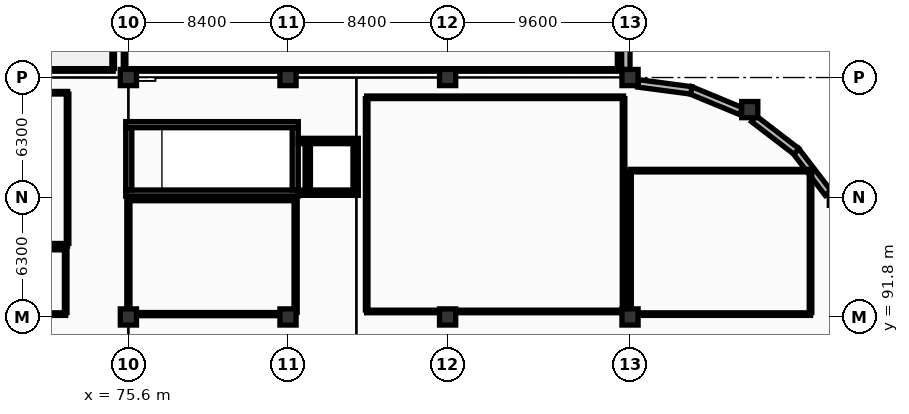
"""IFC4 building model, lengths in metres.
Left out: names, types, materials, properties, quantities, classifications, styles, units other than length and angle.
Written with IfcOpenShell. Run it as: python <this file> out.ifc"""

import sys

from ifc_helpers import new_model, si_unit, direction, frame, frame_2d, origin, origin_2d, place, context, subcontext, project, spatial, rectangle, circle, extrude, element, fill, save


model = new_model("IFC4")
c1 = context("Model", 3, precision=1e-05, world=origin(), true_north=direction((0.0, 1.0)))
c2 = subcontext(c1, "Body", "Model", "MODEL_VIEW")
j1 = project(units=[si_unit("LENGTHUNIT", "METRE"), si_unit("PLANEANGLEUNIT", "RADIAN")], contexts=[c1])
p1 = place(None, origin())
s1 = spatial("IfcSite", under=j1, at=p1, CompositionType="ELEMENT")
p2 = place(p1, origin())
s2 = spatial("IfcBuilding", under=s1, at=p2, CompositionType="ELEMENT")
p3 = place(p2, origin())
s3 = spatial("IfcBuildingStorey", under=s2, at=p3, CompositionType="ELEMENT", Elevation=0.0)
for number, where, z_axis, x_axis in (
    (1, (75.6, 91.8, 0.0), (0.0, 0.0, 1.0), (1.0, 0.0, 0.0)),
    (2, (75.6, 104.4, 0.0), (0.0, 0.0, 1.0), (1.0, 0.0, 0.0)),
    (3, (84.0, 91.8, 0.0), (0.0, 0.0, 1.0), (1.0, 0.0, 0.0)),
    (4, (84.0, 104.4, 0.0), (0.0, 0.0, 1.0), (1.0, 0.0, 0.0)),
    (5, (92.4, 91.8, 0.0), (0.0, 0.0, 1.0), (1.0, 0.0, 0.0)),
    (6, (92.4, 104.4, 0.0), (0.0, 0.0, 1.0), (1.0, 0.0, 0.0)),
    (7, (102.0, 91.8, 0.0), (0.0, 0.0, 1.0), (1.0, 0.0, 0.0)),
    (8, (102.0, 104.4, 0.0), (0.0, 0.0, 1.0), (1.0, 0.0, 0.0)),
):
    element("IfcColumn", number, at=place(p3, frame(where, z_axis=z_axis, x_axis=x_axis)), inside=s3, PredefinedType="COLUMN", context=c2, shape_type="SweptSolid", body=[
        extrude(rectangle(XDim=0.85, YDim=0.85, at=origin_2d()), origin(), (0.0, 0.0, 1.0), 5.4),
    ])
for number, where, z_axis, x_axis in (
    (9, (112.912, 98.1, 0.0), (0.0, 0.0, 1.0), (1.0, 0.0, 0.0)),
    (10, (108.3, 102.712, 0.0), (0.0, 0.0, 1.0), (1.0, 0.0, 0.0)),
):
    element("IfcColumn", number, at=place(p3, frame(where, z_axis=z_axis, x_axis=x_axis)), inside=s3, PredefinedType="COLUMN", context=c2, shape_type="SweptSolid", body=[
        extrude(circle(Radius=0.425, at=origin_2d()), origin(), (0.0, 0.0, 1.0), 5.4),
    ])
p4 = place(p3, frame((101.78, 112.338, 0.0), z_axis=(0.0, 0.0, 1.0), x_axis=(0.0, -1.0, 0.0)))
e11 = element("IfcWall", 11, at=p4, inside=s3, PredefinedType="STANDARD", context=c2, shape_type="SweptSolid", body=[
    extrude(rectangle(XDim=7.521, YDim=0.44, at=frame_2d((3.76, 0.0))), origin(), (0.0, 0.0, 1.0), 4.27),
])
p5 = place(p4, frame((1.563, 0.0, 0.9)))
e12 = element("IfcOpeningElement", 12, at=p5, cuts=e11, PredefinedType="OPENING", context=c2, shape_type="SweptSolid", body=[
    extrude(rectangle(XDim=1.2, YDim=1.85, at=frame_2d((0.6, 0.925))), frame((0.0, 0.23, 0.0), z_axis=(0.0, -1.0, 0.0), x_axis=(1.0, 0.0, 0.0)), (0.0, 0.0, 1.0), 0.46),
])
p6 = place(p4, frame((4.713, 0.0, 0.9)))
e13 = element("IfcOpeningElement", 13, at=p6, cuts=e11, PredefinedType="OPENING", context=c2, shape_type="SweptSolid", body=[
    extrude(rectangle(XDim=1.2, YDim=1.85, at=frame_2d((0.6, 0.925))), frame((0.0, 0.23, 0.0), z_axis=(0.0, -1.0, 0.0), x_axis=(1.0, 0.0, 0.0)), (0.0, 0.0, 1.0), 0.46),
])
p7 = place(p3, frame((112.43, 98.317, 0.0), z_axis=(0.0, 0.0, 1.0), x_axis=(-0.608732750311, 0.793375345407, 0.0)))
e14 = element("IfcWall", 14, at=p7, inside=s3, PredefinedType="ELEMENTEDWALL", context=c2, shape_type="SweptSolid", body=[
    extrude(rectangle(XDim=2.824, YDim=0.395, at=frame_2d((1.412, 0.0))), origin(), (0.0, 0.0, 1.0), 4.27),
])
p8 = place(p3, frame((110.757, 100.511, 0.0), z_axis=(0.0, 0.0, 1.0), x_axis=(-0.793375345407, 0.608732750311, 0.0)))
e15 = element("IfcWall", 15, at=p8, inside=s3, PredefinedType="ELEMENTEDWALL", context=c2, shape_type="SweptSolid", body=[
    extrude(rectangle(XDim=2.824, YDim=0.395, at=frame_2d((1.412, 0.0))), origin(), (0.0, 0.0, 1.0), 4.17),
])
p9 = place(p8, frame((0.962, 0.0, 0.85)))
e16 = element("IfcOpeningElement", 16, at=p9, cuts=e15, PredefinedType="OPENING", context=c2, shape_type="SweptSolid", body=[
    extrude(rectangle(XDim=0.9, YDim=1.85, at=frame_2d((0.45, 0.925))), frame((0.0, 0.208, 0.0), z_axis=(0.0, -1.0, 0.0), x_axis=(1.0, 0.0, 0.0)), (0.0, 0.0, 1.0), 0.415),
])
p10 = place(p3, frame((107.837, 102.633, 0.0), z_axis=(0.0, 0.0, 1.0), x_axis=(-0.923854257916, 0.382744444937, 0.0)))
e17 = element("IfcWall", 17, at=p10, inside=s3, PredefinedType="ELEMENTEDWALL", context=c2, shape_type="SweptSolid", body=[
    extrude(rectangle(XDim=2.892, YDim=0.395, at=frame_2d((1.446, 0.0))), origin(), (0.0, 0.0, 1.0), 4.17),
])
p11 = place(p10, frame((1.03, 0.0, 0.85)))
e18 = element("IfcOpeningElement", 18, at=p11, cuts=e17, PredefinedType="OPENING", context=c2, shape_type="SweptSolid", body=[
    extrude(rectangle(XDim=0.9, YDim=1.85, at=frame_2d((0.45, 0.925))), frame((0.0, 0.208, 0.0), z_axis=(0.0, -1.0, 0.0), x_axis=(1.0, 0.0, 0.0)), (0.0, 0.0, 1.0), 0.415),
])
p12 = place(p3, frame((105.229, 103.723, 0.0), z_axis=(0.0, 0.0, 1.0), x_axis=(-0.991455178228, 0.130447803989, 0.0)))
e19 = element("IfcWall", 19, at=p12, inside=s3, PredefinedType="ELEMENTEDWALL", context=c2, shape_type="SweptSolid", body=[
    extrude(rectangle(XDim=2.824, YDim=0.395, at=frame_2d((1.412, 0.0))), origin(), (0.0, 0.0, 1.0), 4.27),
])
p13 = place(p12, frame((0.962, 0.0, 0.85)))
e20 = element("IfcOpeningElement", 20, at=p13, cuts=e19, PredefinedType="OPENING", context=c2, shape_type="SweptSolid", body=[
    extrude(rectangle(XDim=0.9, YDim=1.85, at=frame_2d((0.45, 0.925))), frame((0.0, 0.208, 0.0), z_axis=(0.0, -1.0, 0.0), x_axis=(1.0, 0.0, 0.0)), (0.0, 0.0, 1.0), 0.415),
])
for number, where, z_axis, x_axis in (
    (21, (75.46, 101.92, 0.0), (0.0, 0.0, 1.0), (1.0, 0.0, 0.0)),
    (22, (84.54, 98.32, 0.0), (0.0, 0.0, 1.0), (-1.0, 0.0, 0.0)),
):
    element("IfcWall", number, at=place(p3, frame(where, z_axis=z_axis, x_axis=x_axis)), inside=s3, PredefinedType="SHEAR", context=c2, shape_type="SweptSolid", body=[
        extrude(rectangle(XDim=9.08, YDim=0.32, at=frame_2d((4.54, 0.0))), origin(), (0.0, 0.0, 1.0), 5.14),
    ])
p14 = place(p3, frame((75.62, 98.48, 0.0), z_axis=(0.0, 0.0, 1.0), x_axis=(0.0, 1.0, 0.0)))
e23 = element("IfcWall", 23, at=p14, inside=s3, PredefinedType="SHEAR", context=c2, shape_type="SweptSolid", body=[
    extrude(rectangle(XDim=3.28, YDim=0.32, at=frame_2d((1.64, 0.0))), origin(), (0.0, 0.0, 1.0), 5.14),
])
p15 = place(p14, frame((1.065, 0.0, 0.0)))
e24 = element("IfcOpeningElement", 24, at=p15, cuts=e23, PredefinedType="OPENING", context=c2, shape_type="SweptSolid", body=[
    extrude(rectangle(XDim=1.15, YDim=2.2, at=frame_2d((0.575, 1.1))), frame((0.0, 0.17, 0.0), z_axis=(0.0, -1.0, 0.0), x_axis=(1.0, 0.0, 0.0)), (0.0, 0.0, 1.0), 0.34),
])
p16 = place(p3, frame((84.38, 101.76, 0.0), z_axis=(0.0, 0.0, 1.0), x_axis=(0.0, -1.0, 0.0)))
e25 = element("IfcWall", 25, at=p16, inside=s3, PredefinedType="SHEAR", context=c2, shape_type="SweptSolid", body=[
    extrude(rectangle(XDim=3.28, YDim=0.32, at=frame_2d((1.64, 0.0))), origin(), (0.0, 0.0, 1.0), 5.14),
])
p17 = place(p3, frame((84.54, 101.06, 0.0), z_axis=(0.0, 0.0, 1.0), x_axis=(1.0, 0.0, 0.0)))
e26 = element("IfcWall", 26, at=p17, inside=s3, PredefinedType="SHEAR", context=c2, shape_type="SweptSolid", body=[
    extrude(rectangle(XDim=3.16, YDim=0.28, at=frame_2d((1.58, 0.0))), origin(), (0.0, 0.0, 1.0), 5.14),
])
p18 = place(p3, frame((87.7, 98.34, 0.0), z_axis=(0.0, 0.0, 1.0), x_axis=(-1.0, 0.0, 0.0)))
e27 = element("IfcWall", 27, at=p18, inside=s3, PredefinedType="SHEAR", context=c2, shape_type="SweptSolid", body=[
    extrude(rectangle(XDim=3.16, YDim=0.28, at=frame_2d((1.58, 0.0))), origin(), (0.0, 0.0, 1.0), 5.14),
])
p19 = place(p18, frame((0.925, 0.0, 0.0)))
e28 = element("IfcOpeningElement", 28, at=p19, cuts=e27, PredefinedType="OPENING", context=c2, shape_type="SweptSolid", body=[
    extrude(rectangle(XDim=0.95, YDim=2.15, at=frame_2d((0.475, 1.075))), frame((0.0, 0.15, 0.0), z_axis=(0.0, -1.0, 0.0), x_axis=(1.0, 0.0, 0.0)), (0.0, 0.0, 1.0), 0.3),
])
for number, where, z_axis, x_axis in (
    (29, (85.04, 98.48, 0.0), (0.0, 0.0, 1.0), (0.0, 1.0, 0.0)),
    (30, (87.56, 100.92, 0.0), (0.0, 0.0, 1.0), (0.0, -1.0, 0.0)),
):
    element("IfcWall", number, at=place(p3, frame(where, z_axis=z_axis, x_axis=x_axis)), inside=s3, PredefinedType="SHEAR", context=c2, shape_type="SweptSolid", body=[
        extrude(rectangle(XDim=2.44, YDim=0.28, at=frame_2d((1.22, 0.0))), origin(), (0.0, 0.0, 1.0), 5.14),
    ])
p20 = place(p3, frame((74.8, 104.8, 0.0), z_axis=(0.0, 0.0, 1.0), x_axis=(-1.0, 0.0, 0.0)))
e31 = element("IfcWall", 31, at=p20, inside=s3, PredefinedType="PARTITIONING", context=c2, shape_type="SweptSolid", body=[
    extrude(rectangle(XDim=15.4, YDim=0.135, at=frame_2d((7.7, 0.0))), origin(), (0.0, 0.0, 1.0), 4.27),
])
p21 = place(p20, frame((2.413, 0.0, 0.0)))
e32 = element("IfcOpeningElement", 32, at=p21, cuts=e31, PredefinedType="OPENING", context=c2, shape_type="SweptSolid", body=[
    extrude(rectangle(XDim=0.95, YDim=2.15, at=frame_2d((0.475, 1.075))), frame((0.0, 0.077, 0.0), z_axis=(0.0, -1.0, 0.0), x_axis=(1.0, 0.0, 0.0)), (0.0, 0.0, 1.0), 0.155),
])
p22 = place(p3, frame((74.8, 112.49, 0.0), z_axis=(0.0, 0.0, 1.0), x_axis=(0.0, -1.0, 0.0)))
e33 = element("IfcWall", 33, at=p22, inside=s3, PredefinedType="PARTITIONING", context=c2, shape_type="SweptSolid", body=[
    extrude(rectangle(XDim=7.613, YDim=0.135, at=frame_2d((3.806, 0.0))), origin(), (0.0, 0.0, 1.0), 4.67),
])
p23 = place(p3, frame((101.566, 104.8, 0.0), z_axis=(0.0, 0.0, 1.0), x_axis=(-1.0, 0.0, 0.0)))
e34 = element("IfcWall", 34, at=p23, inside=s3, PredefinedType="PARTITIONING", context=c2, shape_type="SweptSolid", body=[
    extrude(rectangle(XDim=26.166, YDim=0.135, at=frame_2d((13.083, 0.0))), origin(), (0.0, 0.0, 1.0), 4.27),
])
p24 = place(p23, frame((21.189, 0.0, 0.0)))
e35 = element("IfcOpeningElement", 35, at=p24, cuts=e34, PredefinedType="OPENING", context=c2, shape_type="SweptSolid", body=[
    extrude(rectangle(XDim=0.95, YDim=2.15, at=frame_2d((0.475, 1.075))), frame((0.0, 0.077, 0.0), z_axis=(0.0, -1.0, 0.0), x_axis=(1.0, 0.0, 0.0)), (0.0, 0.0, 1.0), 0.155),
])
p25 = place(p3, frame((75.4, 104.877, 0.0), z_axis=(0.0, 0.0, 1.0), x_axis=(0.0, 1.0, 0.0)))
e36 = element("IfcWall", 36, at=p25, inside=s3, PredefinedType="PARTITIONING", context=c2, shape_type="SweptSolid", body=[
    extrude(rectangle(XDim=7.245, YDim=0.135, at=frame_2d((3.623, 0.0))), origin(), (0.0, 0.0, 1.0), 4.27),
])
p26 = place(p3, frame((101.4, 112.336, 0.0), z_axis=(0.0, 0.0, 1.0), x_axis=(0.0, -1.0, 0.0)))
e37 = element("IfcWall", 37, at=p26, inside=s3, PredefinedType="PARTITIONING", context=c2, shape_type="SweptSolid", body=[
    extrude(rectangle(XDim=7.458, YDim=0.135, at=frame_2d((3.729, 0.0))), origin(), (0.0, 0.0, 1.0), 4.57),
])
for number, where, z_axis, x_axis in (
    (38, (59.0, 103.6, 0.0), (0.0, 0.0, 1.0), (1.0, 0.0, 0.0)),
    (39, (72.4, 95.6, 0.0), (0.0, 0.0, 1.0), (-1.0, 0.0, 0.0)),
):
    element("IfcWall", number, at=place(p3, frame(where, z_axis=z_axis, x_axis=x_axis)), inside=s3, PredefinedType="PARTITIONING", context=c2, shape_type="SweptSolid", body=[
        extrude(rectangle(XDim=13.4, YDim=0.135, at=frame_2d((6.7, 0.0))), origin(), (0.0, 0.0, 1.0), 4.27),
    ])
p27 = place(p3, frame((72.4, 103.522, 0.0), z_axis=(0.0, 0.0, 1.0), x_axis=(0.0, -1.0, 0.0)))
e40 = element("IfcWall", 40, at=p27, inside=s3, PredefinedType="PARTITIONING", context=c2, shape_type="SweptSolid", body=[
    extrude(rectangle(XDim=7.845, YDim=0.135, at=frame_2d((3.922, 0.0))), origin(), (0.0, 0.0, 1.0), 4.52),
])
p28 = place(p27, frame((2.518, 0.0, 0.0)))
e41 = element("IfcOpeningElement", 41, at=p28, cuts=e40, PredefinedType="OPENING", context=c2, shape_type="SweptSolid", body=[
    extrude(rectangle(XDim=0.95, YDim=2.15, at=frame_2d((0.475, 1.075))), frame((0.0, 0.077, 0.0), z_axis=(0.0, -1.0, 0.0), x_axis=(1.0, 0.0, 0.0)), (0.0, 0.0, 1.0), 0.155),
])
p29 = place(p3, frame((67.5, 95.4, 0.0), z_axis=(0.0, 0.0, 1.0), x_axis=(1.0, 0.0, 0.0)))
e42 = element("IfcWall", 42, at=p29, inside=s3, PredefinedType="PARTITIONING", context=c2, shape_type="SweptSolid", body=[
    extrude(rectangle(XDim=4.8, YDim=0.135, at=frame_2d((2.4, 0.0))), origin(), (0.0, 0.0, 1.0), 4.27),
])
p30 = place(p3, frame((72.3, 91.95, 0.0), z_axis=(0.0, 0.0, 1.0), x_axis=(-1.0, 0.0, 0.0)))
e43 = element("IfcWall", 43, at=p30, inside=s3, PredefinedType="PARTITIONING", context=c2, shape_type="SweptSolid", body=[
    extrude(rectangle(XDim=4.8, YDim=0.135, at=frame_2d((2.4, 0.0))), origin(), (0.0, 0.0, 1.0), 4.27),
])
p31 = place(p30, frame((1.61, 0.0, 0.0)))
e44 = element("IfcOpeningElement", 44, at=p31, cuts=e43, PredefinedType="OPENING", context=c2, shape_type="SweptSolid", body=[
    extrude(rectangle(XDim=0.95, YDim=2.15, at=frame_2d((0.475, 1.075))), frame((0.0, 0.077, 0.0), z_axis=(0.0, -1.0, 0.0), x_axis=(1.0, 0.0, 0.0)), (0.0, 0.0, 1.0), 0.155),
])
p32 = place(p3, frame((72.3, 95.323, 0.0), z_axis=(0.0, 0.0, 1.0), x_axis=(0.0, -1.0, 0.0)))
e45 = element("IfcWall", 45, at=p32, inside=s3, PredefinedType="PARTITIONING", context=c2, shape_type="SweptSolid", body=[
    extrude(rectangle(XDim=3.295, YDim=0.135, at=frame_2d((1.647, 0.0))), origin(), (0.0, 0.0, 1.0), 4.47),
])
p33 = place(p3, frame((75.6, 98.0, 0.0), z_axis=(0.0, 0.0, 1.0), x_axis=(1.0, 0.0, 0.0)))
e46 = element("IfcWall", 46, at=p33, inside=s3, PredefinedType="PARTITIONING", context=c2, shape_type="SweptSolid", body=[
    extrude(rectangle(XDim=8.8, YDim=0.165, at=frame_2d((4.4, 0.0))), origin(), (0.0, 0.0, 1.0), 4.27),
])
p34 = place(p3, frame((84.4, 91.95, 0.0), z_axis=(0.0, 0.0, 1.0), x_axis=(-1.0, 0.0, 0.0)))
e47 = element("IfcWall", 47, at=p34, inside=s3, PredefinedType="PARTITIONING", context=c2, shape_type="SweptSolid", body=[
    extrude(rectangle(XDim=8.8, YDim=0.165, at=frame_2d((4.4, 0.0))), origin(), (0.0, 0.0, 1.0), 4.27),
])
p35 = place(p34, frame((4.61, 0.0, 0.0)))
e48 = element("IfcOpeningElement", 48, at=p35, cuts=e47, PredefinedType="OPENING", context=c2, shape_type="SweptSolid", body=[
    extrude(rectangle(XDim=1.0, YDim=2.15, at=frame_2d((0.5, 1.075))), frame((0.0, 0.093, 0.0), z_axis=(0.0, -1.0, 0.0), x_axis=(1.0, 0.0, 0.0)), (0.0, 0.0, 1.0), 0.185),
])
for number, where, z_axis, x_axis in (
    (49, (75.6, 92.042, 0.0), (0.0, 0.0, 1.0), (0.0, 1.0, 0.0)),
    (50, (84.4, 97.907, 0.0), (0.0, 0.0, 1.0), (0.0, -1.0, 0.0)),
):
    element("IfcWall", number, at=place(p3, frame(where, z_axis=z_axis, x_axis=x_axis)), inside=s3, PredefinedType="PARTITIONING", context=c2, shape_type="SweptSolid", body=[
        extrude(rectangle(XDim=5.865, YDim=0.165, at=frame_2d((2.933, 0.0))), origin(), (0.0, 0.0, 1.0), 4.27),
    ])
p36 = place(p3, frame((88.14, 103.36, 0.0), z_axis=(0.0, 0.0, 1.0), x_axis=(1.0, 0.0, 0.0)))
e51 = element("IfcWall", 51, at=p36, inside=s3, PredefinedType="PARTITIONING", context=c2, shape_type="SweptSolid", body=[
    extrude(rectangle(XDim=13.52, YDim=0.135, at=frame_2d((6.76, 0.0))), origin(), (0.0, 0.0, 1.0), 4.27),
])
p37 = place(p3, frame((101.66, 92.09, 0.0), z_axis=(0.0, 0.0, 1.0), x_axis=(-1.0, 0.0, 0.0)))
e52 = element("IfcWall", 52, at=p37, inside=s3, PredefinedType="PARTITIONING", context=c2, shape_type="SweptSolid", body=[
    extrude(rectangle(XDim=13.52, YDim=0.135, at=frame_2d((6.76, 0.0))), origin(), (0.0, 0.0, 1.0), 4.27),
])
p38 = place(p37, frame((2.724, 0.0, 0.0)))
e53 = element("IfcOpeningElement", 53, at=p38, cuts=e52, PredefinedType="OPENING", context=c2, shape_type="SweptSolid", body=[
    extrude(rectangle(XDim=0.95, YDim=2.15, at=frame_2d((0.475, 1.075))), frame((0.0, 0.077, 0.0), z_axis=(0.0, -1.0, 0.0), x_axis=(1.0, 0.0, 0.0)), (0.0, 0.0, 1.0), 0.155),
])
p39 = place(p3, frame((88.14, 92.167, 0.0), z_axis=(0.0, 0.0, 1.0), x_axis=(0.0, 1.0, 0.0)))
e54 = element("IfcWall", 54, at=p39, inside=s3, PredefinedType="PARTITIONING", context=c2, shape_type="SweptSolid", body=[
    extrude(rectangle(XDim=11.115, YDim=0.135, at=frame_2d((5.558, 0.0))), origin(), (0.0, 0.0, 1.0), 4.47),
])
p40 = place(p3, frame((101.66, 103.282, 0.0), z_axis=(0.0, 0.0, 1.0), x_axis=(0.0, -1.0, 0.0)))
e55 = element("IfcWall", 55, at=p40, inside=s3, PredefinedType="PARTITIONING", context=c2, shape_type="SweptSolid", body=[
    extrude(rectangle(XDim=11.115, YDim=0.135, at=frame_2d((5.558, 0.0))), origin(), (0.0, 0.0, 1.0), 4.27),
])
p41 = place(p3, frame((102.0, 99.5, 0.0), z_axis=(0.0, 0.0, 1.0), x_axis=(1.0, 0.0, 0.0)))
e56 = element("IfcWall", 56, at=p41, inside=s3, PredefinedType="PARTITIONING", context=c2, shape_type="SweptSolid", body=[
    extrude(rectangle(XDim=9.5, YDim=0.135, at=frame_2d((4.75, 0.0))), origin(), (0.0, 0.0, 1.0), 4.17),
])
p42 = place(p3, frame((111.5, 91.95, 0.0), z_axis=(0.0, 0.0, 1.0), x_axis=(-1.0, 0.0, 0.0)))
e57 = element("IfcWall", 57, at=p42, inside=s3, PredefinedType="PARTITIONING", context=c2, shape_type="SweptSolid", body=[
    extrude(rectangle(XDim=9.5, YDim=0.135, at=frame_2d((4.75, 0.0))), origin(), (0.0, 0.0, 1.0), 4.17),
])
p43 = place(p42, frame((2.312, 0.0, 0.0)))
e58 = element("IfcOpeningElement", 58, at=p43, cuts=e57, PredefinedType="OPENING", context=c2, shape_type="SweptSolid", body=[
    extrude(rectangle(XDim=0.95, YDim=2.15, at=frame_2d((0.475, 1.075))), frame((0.0, 0.077, 0.0), z_axis=(0.0, -1.0, 0.0), x_axis=(1.0, 0.0, 0.0)), (0.0, 0.0, 1.0), 0.155),
])
for number, where, z_axis, x_axis in (
    (59, (102.0, 92.028, 0.0), (0.0, 0.0, 1.0), (0.0, 1.0, 0.0)),
    (60, (111.5, 99.423, 0.0), (0.0, 0.0, 1.0), (0.0, -1.0, 0.0)),
):
    element("IfcWall", number, at=place(p3, frame(where, z_axis=z_axis, x_axis=x_axis)), inside=s3, PredefinedType="PARTITIONING", context=c2, shape_type="SweptSolid", body=[
        extrude(rectangle(XDim=7.395, YDim=0.135, at=frame_2d((3.698, 0.0))), origin(), (0.0, 0.0, 1.0), 4.27),
    ])
p44 = place(p9, origin())
e61 = element("IfcWindow", 61, at=p44, inside=s3, PartitioningType="SINGLE_PANEL", PredefinedType="WINDOW", context=c2, shape_type="SweptSolid", body=[
    extrude(rectangle(XDim=0.9, YDim=1.85, at=frame_2d((0.45, 0.925))), frame((0.0, 0.03, 0.0), z_axis=(0.0, -1.0, 0.0), x_axis=(1.0, 0.0, 0.0)), (0.0, 0.0, 1.0), 0.06),
])
fill(e16, e61)
p45 = place(p11, origin())
e62 = element("IfcWindow", 62, at=p45, inside=s3, PartitioningType="SINGLE_PANEL", PredefinedType="WINDOW", context=c2, shape_type="SweptSolid", body=[
    extrude(rectangle(XDim=0.9, YDim=1.85, at=frame_2d((0.45, 0.925))), frame((0.0, 0.03, 0.0), z_axis=(0.0, -1.0, 0.0), x_axis=(1.0, 0.0, 0.0)), (0.0, 0.0, 1.0), 0.06),
])
fill(e18, e62)
p46 = place(p13, origin())
e63 = element("IfcWindow", 63, at=p46, inside=s3, PartitioningType="SINGLE_PANEL", PredefinedType="WINDOW", context=c2, shape_type="SweptSolid", body=[
    extrude(rectangle(XDim=0.9, YDim=1.85, at=frame_2d((0.45, 0.925))), frame((0.0, 0.03, 0.0), z_axis=(0.0, -1.0, 0.0), x_axis=(1.0, 0.0, 0.0)), (0.0, 0.0, 1.0), 0.06),
])
fill(e20, e63)
p47 = place(p15, origin())
e64 = element("IfcDoor", 64, at=p47, inside=s3, OperationType="SINGLE_SWING_LEFT", PredefinedType="DOOR", context=c2, shape_type="SweptSolid", body=[
    extrude(rectangle(XDim=1.15, YDim=2.2, at=frame_2d((0.575, 1.1))), frame((0.0, 0.025, 0.0), z_axis=(0.0, -1.0, 0.0), x_axis=(1.0, 0.0, 0.0)), (0.0, 0.0, 1.0), 0.05),
])
fill(e24, e64)
p48 = place(p19, origin())
e65 = element("IfcDoor", 65, at=p48, inside=s3, OperationType="DOUBLE_DOOR_SLIDING", PredefinedType="DOOR", context=c2, shape_type="SweptSolid", body=[
    extrude(rectangle(XDim=0.95, YDim=2.15, at=frame_2d((0.475, 1.075))), frame((0.0, 0.025, 0.0), z_axis=(0.0, -1.0, 0.0), x_axis=(1.0, 0.0, 0.0)), (0.0, 0.0, 1.0), 0.05),
])
fill(e28, e65)
p49 = place(p21, origin())
e66 = element("IfcDoor", 66, at=p49, inside=s3, OperationType="SINGLE_SWING_RIGHT", PredefinedType="DOOR", context=c2, shape_type="SweptSolid", body=[
    extrude(rectangle(XDim=0.95, YDim=2.15, at=frame_2d((0.475, 1.075))), frame((0.0, 0.025, 0.0), z_axis=(0.0, -1.0, 0.0), x_axis=(1.0, 0.0, 0.0)), (0.0, 0.0, 1.0), 0.05),
])
fill(e32, e66)
p50 = place(p24, origin())
e67 = element("IfcDoor", 67, at=p50, inside=s3, OperationType="SINGLE_SWING_LEFT", PredefinedType="DOOR", context=c2, shape_type="SweptSolid", body=[
    extrude(rectangle(XDim=0.95, YDim=2.15, at=frame_2d((0.475, 1.075))), frame((0.0, 0.025, 0.0), z_axis=(0.0, -1.0, 0.0), x_axis=(1.0, 0.0, 0.0)), (0.0, 0.0, 1.0), 0.05),
])
fill(e35, e67)
p51 = place(p28, origin())
e68 = element("IfcDoor", 68, at=p51, inside=s3, OperationType="SINGLE_SWING_LEFT", PredefinedType="DOOR", context=c2, shape_type="SweptSolid", body=[
    extrude(rectangle(XDim=0.95, YDim=2.15, at=frame_2d((0.475, 1.075))), frame((0.0, 0.025, 0.0), z_axis=(0.0, -1.0, 0.0), x_axis=(1.0, 0.0, 0.0)), (0.0, 0.0, 1.0), 0.05),
])
fill(e41, e68)
p52 = place(p35, origin())
e69 = element("IfcDoor", 69, at=p52, inside=s3, OperationType="SINGLE_SWING_LEFT", PredefinedType="DOOR", context=c2, shape_type="SweptSolid", body=[
    extrude(rectangle(XDim=1.0, YDim=2.15, at=frame_2d((0.5, 1.075))), frame((0.0, 0.025, 0.0), z_axis=(0.0, -1.0, 0.0), x_axis=(1.0, 0.0, 0.0)), (0.0, 0.0, 1.0), 0.05),
])
fill(e48, e69)
p53 = place(p38, origin())
e70 = element("IfcDoor", 70, at=p53, inside=s3, OperationType="SINGLE_SWING_RIGHT", PredefinedType="DOOR", context=c2, shape_type="SweptSolid", body=[
    extrude(rectangle(XDim=0.95, YDim=2.15, at=frame_2d((0.475, 1.075))), frame((0.0, 0.025, 0.0), z_axis=(0.0, -1.0, 0.0), x_axis=(1.0, 0.0, 0.0)), (0.0, 0.0, 1.0), 0.05),
])
fill(e53, e70)
p54 = place(p43, origin())
e71 = element("IfcDoor", 71, at=p54, inside=s3, OperationType="SINGLE_SWING_RIGHT", PredefinedType="DOOR", context=c2, shape_type="SweptSolid", body=[
    extrude(rectangle(XDim=0.95, YDim=2.15, at=frame_2d((0.475, 1.075))), frame((0.0, 0.025, 0.0), z_axis=(0.0, -1.0, 0.0), x_axis=(1.0, 0.0, 0.0)), (0.0, 0.0, 1.0), 0.05),
])
fill(e58, e71)
save(model, sys.argv[1])
